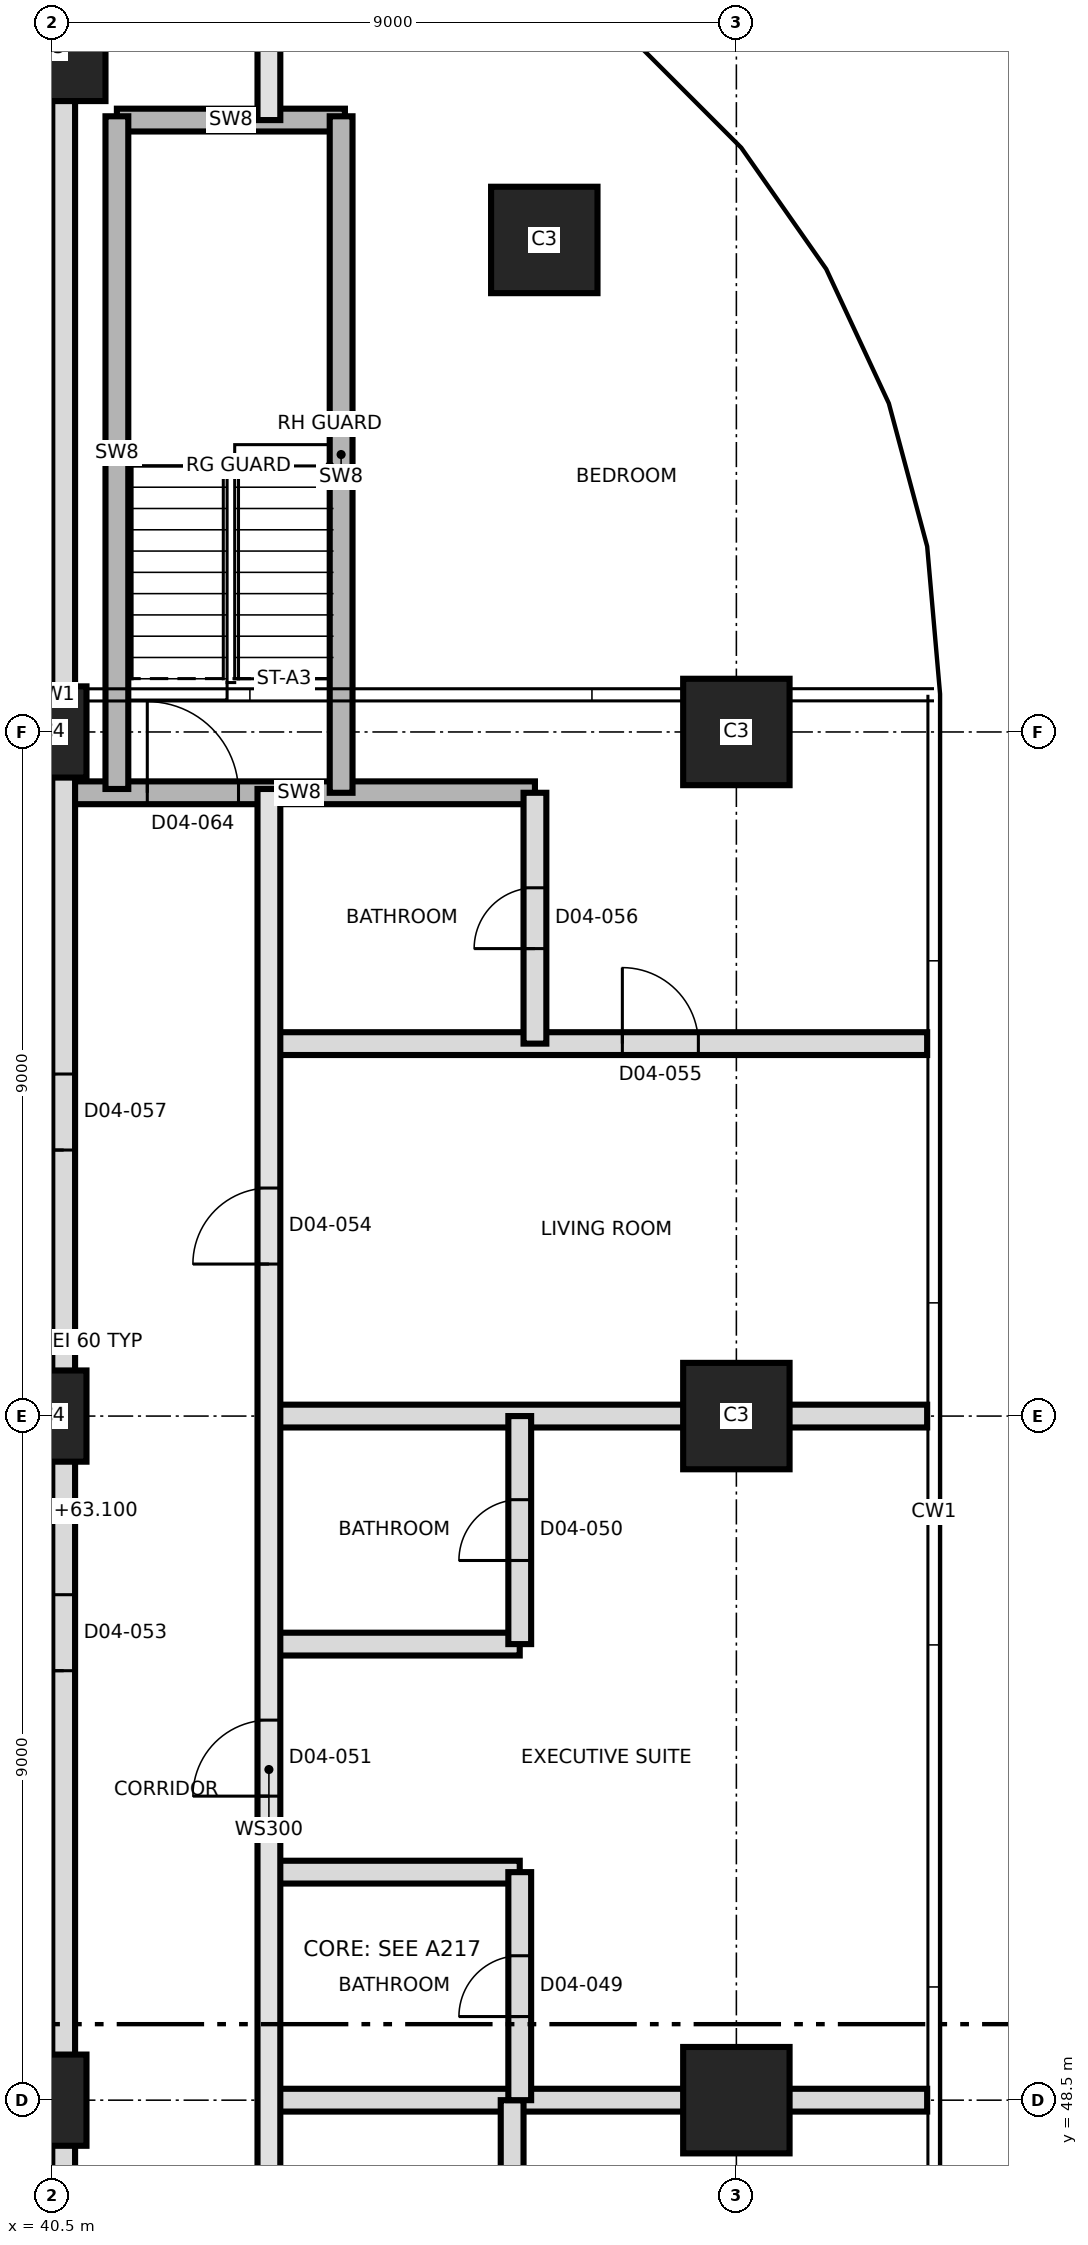
"""IFC4 building model, lengths in metres.
Left out: names, types, materials, properties, quantities, classifications, styles, units other than length and angle.
Written with IfcOpenShell. Run it as: python <this file> out.ifc"""

import sys

from ifc_helpers import new_model, si_unit, direction, frame, frame_2d, origin, origin_2d, place, context, subcontext, project, spatial, rectangle, extrude, element, fill, save


model = new_model("IFC4")
c1 = context("Model", 3, precision=1e-05, world=origin(), true_north=direction((0.0, 1.0)))
c2 = subcontext(c1, "Body", "Model", "MODEL_VIEW")
j1 = project(units=[si_unit("LENGTHUNIT", "METRE"), si_unit("PLANEANGLEUNIT", "RADIAN")], contexts=[c1])
p1 = place(None, origin())
s1 = spatial("IfcSite", under=j1, at=p1, CompositionType="ELEMENT")
p2 = place(p1, origin())
s2 = spatial("IfcBuilding", under=s1, at=p2, CompositionType="ELEMENT")
p3 = place(p2, frame((0.0, 0.0, 63.1)))
s3 = spatial("IfcBuildingStorey", under=s2, at=p3, CompositionType="ELEMENT", Elevation=63.1)
p4 = place(p3, frame((40.5, 48.5, 0.0), z_axis=(0.0, 0.0, 1.0), x_axis=(0.0, 1.0, 0.0)))
e1 = element("IfcColumn", 1, at=p4, inside=s3, PredefinedType="COLUMN", context=c2, shape_type="SweptSolid", body=[
    extrude(rectangle(XDim=1.2, YDim=0.9, at=origin_2d()), origin(), (0.0, 0.0, 1.0), 3.7),
])
p5 = place(p3, frame((49.5, 48.5, 0.0), z_axis=(0.0, 0.0, 1.0), x_axis=(1.0, 0.0, 0.0)))
e2 = element("IfcColumn", 2, at=p5, inside=s3, PredefinedType="COLUMN", context=c2, shape_type="SweptSolid", body=[
    extrude(rectangle(XDim=1.4, YDim=1.4, at=origin_2d()), origin(), (0.0, 0.0, 1.0), 3.7),
])
p6 = place(p3, frame((40.5, 57.5, 0.0), z_axis=(0.0, 0.0, 1.0), x_axis=(0.0, 1.0, 0.0)))
e3 = element("IfcColumn", 3, at=p6, inside=s3, PredefinedType="COLUMN", context=c2, shape_type="SweptSolid", body=[
    extrude(rectangle(XDim=1.2, YDim=0.9, at=origin_2d()), origin(), (0.0, 0.0, 1.0), 3.7),
])
p7 = place(p3, frame((49.5, 57.5, 0.0), z_axis=(0.0, 0.0, 1.0), x_axis=(1.0, 0.0, 0.0)))
e4 = element("IfcColumn", 4, at=p7, inside=s3, PredefinedType="COLUMN", context=c2, shape_type="SweptSolid", body=[
    extrude(rectangle(XDim=1.4, YDim=1.4, at=origin_2d()), origin(), (0.0, 0.0, 1.0), 3.7),
])
p8 = place(p3, frame((40.5, 66.5, 0.0), z_axis=(0.0, 0.0, 1.0), x_axis=(0.0, 1.0, 0.0)))
e5 = element("IfcColumn", 5, at=p8, inside=s3, PredefinedType="COLUMN", context=c2, shape_type="SweptSolid", body=[
    extrude(rectangle(XDim=1.2, YDim=0.9, at=origin_2d()), origin(), (0.0, 0.0, 1.0), 3.7),
])
for number, where, z_axis, x_axis in (
    (6, (49.5, 66.5, 0.0), (0.0, 0.0, 1.0), (1.0, 0.0, 0.0)),
    (7, (46.973, 72.973, 0.0), (0.0, 0.0, 1.0), (1.0, 0.0, 0.0)),
    (8, (40.5, 75.5, 0.0), (0.0, 0.0, 1.0), (1.0, 0.0, 0.0)),
):
    element("IfcColumn", number, at=place(p3, frame(where, z_axis=z_axis, x_axis=x_axis)), inside=s3, PredefinedType="COLUMN", context=c2, shape_type="SweptSolid", body=[
        extrude(rectangle(XDim=1.4, YDim=1.4, at=origin_2d()), origin(), (0.0, 0.0, 1.0), 3.7),
    ])
p9 = place(p3, frame((29.17, 48.5, 0.0), z_axis=(0.0, 0.0, 1.0), x_axis=(1.0, 0.0, 0.0)))
e9 = element("IfcWall", 9, at=p9, inside=s3, PredefinedType="PARTITIONING", context=c2, shape_type="SweptSolid", body=[
    extrude(rectangle(XDim=11.48, YDim=0.3, at=frame_2d((5.74, 0.0))), origin(), (0.0, 0.0, 1.0), 3.4),
])
p10 = place(p3, frame((43.35, 48.5, 0.0), z_axis=(0.0, 0.0, 1.0), x_axis=(1.0, 0.0, 0.0)))
e10 = element("IfcWall", 10, at=p10, inside=s3, PredefinedType="PARTITIONING", context=c2, shape_type="SweptSolid", body=[
    extrude(rectangle(XDim=8.66, YDim=0.3, at=frame_2d((4.33, 0.0))), origin(), (0.0, 0.0, 1.0), 3.4),
])
p11 = place(p3, frame((43.35, 51.5, 0.0), z_axis=(0.0, 0.0, 1.0), x_axis=(1.0, 0.0, 0.0)))
e11 = element("IfcWall", 11, at=p11, inside=s3, PredefinedType="PARTITIONING", context=c2, shape_type="SweptSolid", body=[
    extrude(rectangle(XDim=3.3, YDim=0.3, at=frame_2d((1.65, 0.0))), origin(), (0.0, 0.0, 1.0), 3.4),
])
p12 = place(p3, frame((37.15, 51.8, 0.0), z_axis=(0.0, 0.0, 1.0), x_axis=(1.0, 0.0, 0.0)))
e12 = element("IfcWall", 12, at=p12, inside=s3, PredefinedType="PARTITIONING", context=c2, shape_type="SweptSolid", body=[
    extrude(rectangle(XDim=3.5, YDim=0.3, at=frame_2d((1.75, 0.0))), origin(), (0.0, 0.0, 1.0), 3.4),
])
p13 = place(p3, frame((43.35, 54.5, 0.0), z_axis=(0.0, 0.0, 1.0), x_axis=(1.0, 0.0, 0.0)))
e13 = element("IfcWall", 13, at=p13, inside=s3, PredefinedType="PARTITIONING", context=c2, shape_type="SweptSolid", body=[
    extrude(rectangle(XDim=3.3, YDim=0.3, at=frame_2d((1.65, 0.0))), origin(), (0.0, 0.0, 1.0), 3.4),
])
p14 = place(p3, frame((29.17, 57.5, 0.0), z_axis=(0.0, 0.0, 1.0), x_axis=(1.0, 0.0, 0.0)))
e14 = element("IfcWall", 14, at=p14, inside=s3, PredefinedType="PARTITIONING", context=c2, shape_type="SweptSolid", body=[
    extrude(rectangle(XDim=11.48, YDim=0.3, at=frame_2d((5.74, 0.0))), origin(), (0.0, 0.0, 1.0), 3.4),
])
p15 = place(p3, frame((43.35, 57.5, 0.0), z_axis=(0.0, 0.0, 1.0), x_axis=(1.0, 0.0, 0.0)))
e15 = element("IfcWall", 15, at=p15, inside=s3, PredefinedType="PARTITIONING", context=c2, shape_type="SweptSolid", body=[
    extrude(rectangle(XDim=8.66, YDim=0.3, at=frame_2d((4.33, 0.0))), origin(), (0.0, 0.0, 1.0), 3.4),
])
p16 = place(p3, frame((43.35, 62.4, 0.0), z_axis=(0.0, 0.0, 1.0), x_axis=(1.0, 0.0, 0.0)))
e16 = element("IfcWall", 16, at=p16, inside=s3, PredefinedType="PARTITIONING", context=c2, shape_type="SweptSolid", body=[
    extrude(rectangle(XDim=8.66, YDim=0.3, at=frame_2d((4.33, 0.0))), origin(), (0.0, 0.0, 1.0), 3.4),
])
p17 = place(p16, frame((4.65, 0.0, 0.0)))
e17 = element("IfcOpeningElement", 17, at=p17, cuts=e16, PredefinedType="OPENING", context=c2, shape_type="SweptSolid", body=[
    extrude(rectangle(XDim=1.0, YDim=2.1, at=frame_2d((0.5, 1.05))), frame((0.0, 0.16, 0.0), z_axis=(0.0, -1.0, 0.0), x_axis=(1.0, 0.0, 0.0)), (0.0, 0.0, 1.0), 0.32),
])
p18 = place(p3, frame((40.65, 65.7, 0.0), z_axis=(0.0, 0.0, 1.0), x_axis=(1.0, 0.0, 0.0)))
e18 = element("IfcWall", 18, at=p18, inside=s3, PredefinedType="SHEAR", context=c2, shape_type="SweptSolid", body=[
    extrude(rectangle(XDim=6.2, YDim=0.3, at=frame_2d((3.1, 0.0))), origin(), (0.0, 0.0, 1.0), 3.4),
])
p19 = place(p18, frame((1.1, 0.0, 0.0)))
e19 = element("IfcOpeningElement", 19, at=p19, cuts=e18, PredefinedType="OPENING", context=c2, shape_type="SweptSolid", body=[
    extrude(rectangle(XDim=1.2, YDim=2.1, at=frame_2d((0.6, 1.05))), frame((0.0, 0.16, 0.0), z_axis=(0.0, -1.0, 0.0), x_axis=(1.0, 0.0, 0.0)), (0.0, 0.0, 1.0), 0.32),
])
p20 = place(p3, frame((29.333, 69.8, 0.0), z_axis=(0.0, 0.0, 1.0), x_axis=(1.0, 0.0, 0.0)))
e20 = element("IfcWall", 20, at=p20, inside=s3, PredefinedType="PARTITIONING", context=c2, shape_type="SweptSolid", body=[
    extrude(rectangle(XDim=11.317, YDim=0.3, at=frame_2d((5.658, 0.0))), origin(), (0.0, 0.0, 1.0), 3.4),
])
p21 = place(p20, frame((5.667, 0.0, 0.0)))
e21 = element("IfcOpeningElement", 21, at=p21, cuts=e20, PredefinedType="OPENING", context=c2, shape_type="SweptSolid", body=[
    extrude(rectangle(XDim=1.0, YDim=2.1, at=frame_2d((0.5, 1.05))), frame((0.0, 0.16, 0.0), z_axis=(0.0, -1.0, 0.0), x_axis=(1.0, 0.0, 0.0)), (0.0, 0.0, 1.0), 0.32),
])
p22 = place(p3, frame((37.15, 73.1, 0.0), z_axis=(0.0, 0.0, 1.0), x_axis=(1.0, 0.0, 0.0)))
e22 = element("IfcWall", 22, at=p22, inside=s3, PredefinedType="PARTITIONING", context=c2, shape_type="SweptSolid", body=[
    extrude(rectangle(XDim=3.5, YDim=0.3, at=frame_2d((1.75, 0.0))), origin(), (0.0, 0.0, 1.0), 3.4),
])
p23 = place(p3, frame((41.35, 74.55, 0.0), z_axis=(0.0, 0.0, 1.0), x_axis=(1.0, 0.0, 0.0)))
e23 = element("IfcWall", 23, at=p23, inside=s3, PredefinedType="SHEAR", context=c2, shape_type="SweptSolid", body=[
    extrude(rectangle(XDim=3.0, YDim=0.3, at=frame_2d((1.5, 0.0))), origin(), (0.0, 0.0, 1.0), 3.4),
])
p24 = place(p3, frame((40.65, 39.95, 0.0), z_axis=(0.0, 0.0, 1.0), x_axis=(0.0, 1.0, 0.0)))
e24 = element("IfcWall", 24, at=p24, inside=s3, PredefinedType="PARTITIONING", context=c2, shape_type="SweptSolid", body=[
    extrude(rectangle(XDim=37.05, YDim=0.3, at=frame_2d((18.525, 0.0))), origin(), (0.0, 0.0, 1.0), 3.4),
])
p25 = place(p24, frame((0.58, 0.0, 0.0)))
e25 = element("IfcOpeningElement", 25, at=p25, cuts=e24, PredefinedType="OPENING", context=c2, shape_type="SweptSolid", body=[
    extrude(rectangle(XDim=1.0, YDim=2.1, at=frame_2d((0.5, 1.05))), frame((0.0, 0.16, 0.0), z_axis=(0.0, -1.0, 0.0), x_axis=(1.0, 0.0, 0.0)), (0.0, 0.0, 1.0), 0.32),
])
p26 = place(p24, frame((6.43, 0.0, 0.0)))
e26 = element("IfcOpeningElement", 26, at=p26, cuts=e24, PredefinedType="OPENING", context=c2, shape_type="SweptSolid", body=[
    extrude(rectangle(XDim=1.0, YDim=2.1, at=frame_2d((0.5, 1.05))), frame((0.0, 0.16, 0.0), z_axis=(0.0, -1.0, 0.0), x_axis=(1.0, 0.0, 0.0)), (0.0, 0.0, 1.0), 0.32),
])
p27 = place(p24, frame((14.2, 0.0, 0.0)))
e27 = element("IfcOpeningElement", 27, at=p27, cuts=e24, PredefinedType="OPENING", context=c2, shape_type="SweptSolid", body=[
    extrude(rectangle(XDim=1.0, YDim=2.4, at=frame_2d((0.5, 1.2))), frame((0.0, 0.16, 0.0), z_axis=(0.0, -1.0, 0.0), x_axis=(1.0, 0.0, 0.0)), (0.0, 0.0, 1.0), 0.32),
])
p28 = place(p24, frame((21.05, 0.0, 0.0)))
e28 = element("IfcOpeningElement", 28, at=p28, cuts=e24, PredefinedType="OPENING", context=c2, shape_type="SweptSolid", body=[
    extrude(rectangle(XDim=1.0, YDim=2.4, at=frame_2d((0.5, 1.2))), frame((0.0, 0.16, 0.0), z_axis=(0.0, -1.0, 0.0), x_axis=(1.0, 0.0, 0.0)), (0.0, 0.0, 1.0), 0.32),
])
p29 = place(p3, frame((41.35, 65.75, 0.0), z_axis=(0.0, 0.0, 1.0), x_axis=(0.0, 1.0, 0.0)))
e29 = element("IfcWall", 29, at=p29, inside=s3, PredefinedType="SHEAR", context=c2, shape_type="SweptSolid", body=[
    extrude(rectangle(XDim=8.85, YDim=0.3, at=frame_2d((4.425, 0.0))), origin(), (0.0, 0.0, 1.0), 3.4),
])
p30 = place(p3, frame((43.35, 39.95, 0.0), z_axis=(0.0, 0.0, 1.0), x_axis=(0.0, 1.0, 0.0)))
e30 = element("IfcWall", 30, at=p30, inside=s3, PredefinedType="SOLIDWALL", context=c2, shape_type="SweptSolid", body=[
    extrude(rectangle(XDim=25.8, YDim=0.3, at=frame_2d((12.9, 0.0))), origin(), (0.0, 0.0, 1.0), 3.4),
])
p31 = place(p30, frame((2.47, 0.0, 0.0)))
e31 = element("IfcOpeningElement", 31, at=p31, cuts=e30, PredefinedType="OPENING", context=c2, shape_type="SweptSolid", body=[
    extrude(rectangle(XDim=1.0, YDim=2.1, at=frame_2d((0.5, 1.05))), frame((0.0, 0.16, 0.0), z_axis=(0.0, -1.0, 0.0), x_axis=(1.0, 0.0, 0.0)), (0.0, 0.0, 1.0), 0.32),
])
p32 = place(p30, frame((4.27, 0.0, 0.0)))
e32 = element("IfcOpeningElement", 32, at=p32, cuts=e30, PredefinedType="OPENING", context=c2, shape_type="SweptSolid", body=[
    extrude(rectangle(XDim=1.0, YDim=2.1, at=frame_2d((0.5, 1.05))), frame((0.0, 0.16, 0.0), z_axis=(0.0, -1.0, 0.0), x_axis=(1.0, 0.0, 0.0)), (0.0, 0.0, 1.0), 0.32),
])
p33 = place(p30, frame((12.55, 0.0, 0.0)))
e33 = element("IfcOpeningElement", 33, at=p33, cuts=e30, PredefinedType="OPENING", context=c2, shape_type="SweptSolid", body=[
    extrude(rectangle(XDim=1.0, YDim=2.4, at=frame_2d((0.5, 1.2))), frame((0.0, 0.16, 0.0), z_axis=(0.0, -1.0, 0.0), x_axis=(1.0, 0.0, 0.0)), (0.0, 0.0, 1.0), 0.32),
])
p34 = place(p30, frame((19.55, 0.0, 0.0)))
e34 = element("IfcOpeningElement", 34, at=p34, cuts=e30, PredefinedType="OPENING", context=c2, shape_type="SweptSolid", body=[
    extrude(rectangle(XDim=1.0, YDim=2.4, at=frame_2d((0.5, 1.2))), frame((0.0, 0.16, 0.0), z_axis=(0.0, -1.0, 0.0), x_axis=(1.0, 0.0, 0.0)), (0.0, 0.0, 1.0), 0.32),
])
p35 = place(p3, frame((43.35, 74.55, 0.0), z_axis=(0.0, 0.0, 1.0), x_axis=(0.0, 1.0, 0.0)))
e35 = element("IfcWall", 35, at=p35, inside=s3, PredefinedType="SOLIDWALL", context=c2, shape_type="SweptSolid", body=[
    extrude(rectangle(XDim=2.45, YDim=0.3, at=frame_2d((1.225, 0.0))), origin(), (0.0, 0.0, 1.0), 3.4),
])
p36 = place(p3, frame((44.3, 65.7, 0.0), z_axis=(0.0, 0.0, 1.0), x_axis=(0.0, 1.0, 0.0)))
e36 = element("IfcWall", 36, at=p36, inside=s3, PredefinedType="SHEAR", context=c2, shape_type="SweptSolid", body=[
    extrude(rectangle(XDim=8.9, YDim=0.3, at=frame_2d((4.45, 0.0))), origin(), (0.0, 0.0, 1.0), 3.4),
])
p37 = place(p3, frame((46.55, 45.8, 0.0), z_axis=(0.0, 0.0, 1.0), x_axis=(0.0, 1.0, 0.0)))
e37 = element("IfcWall", 37, at=p37, inside=s3, PredefinedType="PARTITIONING", context=c2, shape_type="SweptSolid", body=[
    extrude(rectangle(XDim=2.7, YDim=0.3, at=frame_2d((1.35, 0.0))), origin(), (0.0, 0.0, 1.0), 3.4),
])
p38 = place(p37, frame((0.95, 0.0, 0.0)))
e38 = element("IfcOpeningElement", 38, at=p38, cuts=e37, PredefinedType="OPENING", context=c2, shape_type="SweptSolid", body=[
    extrude(rectangle(XDim=0.8, YDim=2.1, at=frame_2d((0.4, 1.05))), frame((0.0, 0.16, 0.0), z_axis=(0.0, -1.0, 0.0), x_axis=(1.0, 0.0, 0.0)), (0.0, 0.0, 1.0), 0.32),
])
p39 = place(p3, frame((46.65, 48.5, 0.0), z_axis=(0.0, 0.0, 1.0), x_axis=(0.0, 1.0, 0.0)))
e39 = element("IfcWall", 39, at=p39, inside=s3, PredefinedType="PARTITIONING", context=c2, shape_type="SweptSolid", body=[
    extrude(rectangle(XDim=3.0, YDim=0.3, at=frame_2d((1.5, 0.0))), origin(), (0.0, 0.0, 1.0), 3.4),
])
p40 = place(p39, frame((1.1, 0.0, 0.0)))
e40 = element("IfcOpeningElement", 40, at=p40, cuts=e39, PredefinedType="OPENING", context=c2, shape_type="SweptSolid", body=[
    extrude(rectangle(XDim=0.8, YDim=2.1, at=frame_2d((0.4, 1.05))), frame((0.0, 0.16, 0.0), z_axis=(0.0, -1.0, 0.0), x_axis=(1.0, 0.0, 0.0)), (0.0, 0.0, 1.0), 0.32),
])
p41 = place(p3, frame((46.65, 54.5, 0.0), z_axis=(0.0, 0.0, 1.0), x_axis=(0.0, 1.0, 0.0)))
e41 = element("IfcWall", 41, at=p41, inside=s3, PredefinedType="PARTITIONING", context=c2, shape_type="SweptSolid", body=[
    extrude(rectangle(XDim=3.0, YDim=0.3, at=frame_2d((1.5, 0.0))), origin(), (0.0, 0.0, 1.0), 3.4),
])
p42 = place(p41, frame((1.1, 0.0, 0.0)))
e42 = element("IfcOpeningElement", 42, at=p42, cuts=e41, PredefinedType="OPENING", context=c2, shape_type="SweptSolid", body=[
    extrude(rectangle(XDim=0.8, YDim=2.1, at=frame_2d((0.4, 1.05))), frame((0.0, 0.16, 0.0), z_axis=(0.0, -1.0, 0.0), x_axis=(1.0, 0.0, 0.0)), (0.0, 0.0, 1.0), 0.32),
])
p43 = place(p3, frame((46.85, 62.4, 0.0), z_axis=(0.0, 0.0, 1.0), x_axis=(0.0, 1.0, 0.0)))
e43 = element("IfcWall", 43, at=p43, inside=s3, PredefinedType="PARTITIONING", context=c2, shape_type="SweptSolid", body=[
    extrude(rectangle(XDim=3.3, YDim=0.3, at=frame_2d((1.65, 0.0))), origin(), (0.0, 0.0, 1.0), 3.4),
])
p44 = place(p43, frame((1.25, 0.0, 0.0)))
e44 = element("IfcOpeningElement", 44, at=p44, cuts=e43, PredefinedType="OPENING", context=c2, shape_type="SweptSolid", body=[
    extrude(rectangle(XDim=0.8, YDim=2.1, at=frame_2d((0.4, 1.05))), frame((0.0, 0.16, 0.0), z_axis=(0.0, -1.0, 0.0), x_axis=(1.0, 0.0, 0.0)), (0.0, 0.0, 1.0), 0.32),
])
p45 = place(p40, origin())
e45 = element("IfcDoor", 45, at=p45, inside=s3, OperationType="SINGLE_SWING_LEFT", PredefinedType="DOOR", context=c2, shape_type="SweptSolid", body=[
    extrude(rectangle(XDim=0.8, YDim=2.1, at=frame_2d((0.4, 1.05))), frame((0.0, 0.025, 0.0), z_axis=(0.0, -1.0, 0.0), x_axis=(1.0, 0.0, 0.0)), (0.0, 0.0, 1.0), 0.05),
])
fill(e40, e45)
p46 = place(p42, origin())
e46 = element("IfcDoor", 46, at=p46, inside=s3, OperationType="SINGLE_SWING_LEFT", PredefinedType="DOOR", context=c2, shape_type="SweptSolid", body=[
    extrude(rectangle(XDim=0.8, YDim=2.1, at=frame_2d((0.4, 1.05))), frame((0.0, 0.025, 0.0), z_axis=(0.0, -1.0, 0.0), x_axis=(1.0, 0.0, 0.0)), (0.0, 0.0, 1.0), 0.05),
])
fill(e42, e46)
p47 = place(p33, origin())
e47 = element("IfcDoor", 47, at=p47, inside=s3, OperationType="SINGLE_SWING_RIGHT", PredefinedType="DOOR", context=c2, shape_type="SweptSolid", body=[
    extrude(rectangle(XDim=1.0, YDim=2.4, at=frame_2d((0.5, 1.2))), frame((0.0, 0.025, 0.0), z_axis=(0.0, -1.0, 0.0), x_axis=(1.0, 0.0, 0.0)), (0.0, 0.0, 1.0), 0.05),
])
fill(e33, e47)
p48 = place(p27, origin())
e48 = element("IfcDoor", 48, at=p48, inside=s3, OperationType="SINGLE_SWING_RIGHT", PredefinedType="DOOR", context=c2, shape_type="SweptSolid", body=[
    extrude(rectangle(XDim=1.0, YDim=2.4, at=frame_2d((0.5, 1.2))), frame((0.0, 0.025, 0.0), z_axis=(0.0, -1.0, 0.0), x_axis=(1.0, 0.0, 0.0)), (0.0, 0.0, 1.0), 0.05),
])
fill(e27, e48)
p49 = place(p34, origin())
e49 = element("IfcDoor", 49, at=p49, inside=s3, OperationType="SINGLE_SWING_LEFT", PredefinedType="DOOR", context=c2, shape_type="SweptSolid", body=[
    extrude(rectangle(XDim=1.0, YDim=2.4, at=frame_2d((0.5, 1.2))), frame((0.0, 0.025, 0.0), z_axis=(0.0, -1.0, 0.0), x_axis=(1.0, 0.0, 0.0)), (0.0, 0.0, 1.0), 0.05),
])
fill(e34, e49)
p50 = place(p17, origin())
e50 = element("IfcDoor", 50, at=p50, inside=s3, OperationType="SINGLE_SWING_RIGHT", PredefinedType="DOOR", context=c2, shape_type="SweptSolid", body=[
    extrude(rectangle(XDim=1.0, YDim=2.1, at=frame_2d((0.5, 1.05))), frame((0.0, 0.025, 0.0), z_axis=(0.0, -1.0, 0.0), x_axis=(1.0, 0.0, 0.0)), (0.0, 0.0, 1.0), 0.05),
])
fill(e17, e50)
p51 = place(p44, origin())
e51 = element("IfcDoor", 51, at=p51, inside=s3, OperationType="SINGLE_SWING_LEFT", PredefinedType="DOOR", context=c2, shape_type="SweptSolid", body=[
    extrude(rectangle(XDim=0.8, YDim=2.1, at=frame_2d((0.4, 1.05))), frame((0.0, 0.025, 0.0), z_axis=(0.0, -1.0, 0.0), x_axis=(1.0, 0.0, 0.0)), (0.0, 0.0, 1.0), 0.05),
])
fill(e44, e51)
p52 = place(p28, origin())
e52 = element("IfcDoor", 52, at=p52, inside=s3, OperationType="SINGLE_SWING_LEFT", PredefinedType="DOOR", context=c2, shape_type="SweptSolid", body=[
    extrude(rectangle(XDim=1.0, YDim=2.4, at=frame_2d((0.5, 1.2))), frame((0.0, 0.025, 0.0), z_axis=(0.0, -1.0, 0.0), x_axis=(1.0, 0.0, 0.0)), (0.0, 0.0, 1.0), 0.05),
])
fill(e28, e52)
p53 = place(p19, origin())
e53 = element("IfcDoor", 53, at=p53, inside=s3, OperationType="SINGLE_SWING_RIGHT", PredefinedType="DOOR", context=c2, shape_type="SweptSolid", body=[
    extrude(rectangle(XDim=1.2, YDim=2.1, at=frame_2d((0.6, 1.05))), frame((0.0, 0.025, 0.0), z_axis=(0.0, -1.0, 0.0), x_axis=(1.0, 0.0, 0.0)), (0.0, 0.0, 1.0), 0.05),
])
fill(e19, e53)
save(model, sys.argv[1])
